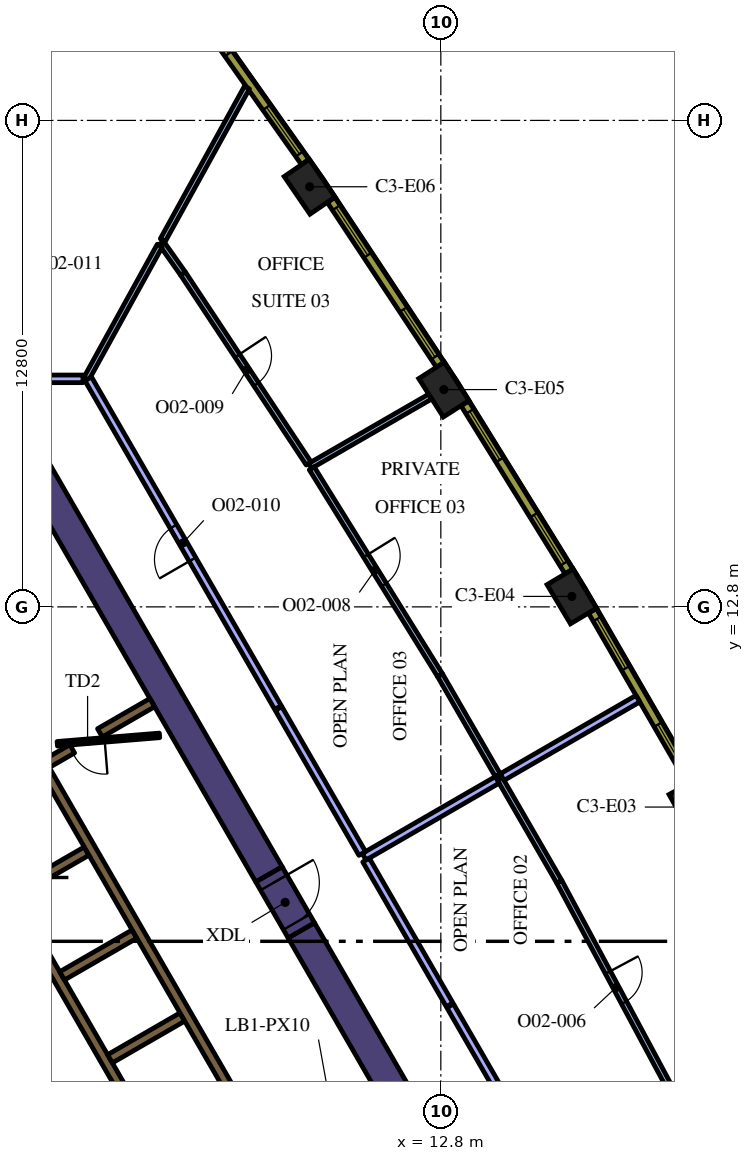
"""IFC4 building model, lengths in metres.
Left out: names, types, materials, properties, quantities, classifications, styles, units other than length and angle.
Written with IfcOpenShell. Run it as: python <this file> out.ifc"""

import sys

from ifc_helpers import new_model, si_unit, direction, frame, frame_2d, origin, origin_2d, place, context, subcontext, project, spatial, rectangle, extrude, element, fill, save


model = new_model("IFC4")
c1 = context("Model", 3, precision=1e-05, world=origin(), true_north=direction((0.0, 1.0)))
c2 = subcontext(c1, "Body", "Model", "MODEL_VIEW")
j1 = project(units=[si_unit("LENGTHUNIT", "METRE"), si_unit("PLANEANGLEUNIT", "RADIAN")], contexts=[c1])
p1 = place(None, origin())
s1 = spatial("IfcSite", under=j1, at=p1, CompositionType="ELEMENT")
p2 = place(p1, origin())
s2 = spatial("IfcBuilding", under=s1, at=p2, CompositionType="ELEMENT")
p3 = place(p2, frame((0.0, 0.0, 162.6)))
s3 = spatial("IfcBuildingStorey", under=s2, at=p3, CompositionType="ELEMENT", Elevation=162.6)
for number, where, z_axis, x_axis in (
    (1, (19.447, 7.533, 0.0), (0.0, 0.0, 1.0), (-0.487, 0.874, 0.0)),
    (2, (16.247, 13.075, 0.0), (0.0, 0.0, 1.0), (-0.513, 0.858, 0.0)),
    (3, (12.88, 18.517, 0.0), (0.0, 0.0, 1.0), (-0.539, 0.842, 0.0)),
    (4, (9.348, 23.854, 0.0), (0.0, 0.0, 1.0), (-0.565, 0.825, 0.0)),
):
    element("IfcColumn", number, at=place(p3, frame(where, z_axis=z_axis, x_axis=x_axis)), inside=s3, PredefinedType="COLUMN", context=c2, shape_type="SweptSolid", body=[
        extrude(rectangle(XDim=1.2, YDim=0.8, at=origin_2d()), origin(), (0.0, 0.0, 1.0), 4.2),
    ])
p4 = place(p3, frame((9.129, 4.289, 0.0), z_axis=(0.0, 0.0, 1.0), x_axis=(0.499995742806, -0.866027861663, 0.0)))
e5 = element("IfcWall", 5, at=p4, inside=s3, PredefinedType="SOLIDWALL", context=c2, shape_type="SweptSolid", body=[
    extrude(rectangle(XDim=12.527, YDim=0.8, at=frame_2d((6.264, 0.0))), origin(), (0.0, 0.0, 1.0), 4.2),
])
p5 = place(p3, frame((8.279, 5.761, 0.0), z_axis=(0.0, 0.0, 1.0), x_axis=(-0.500010359015, 0.866019422922, 0.0)))
e6 = element("IfcWall", 6, at=p5, inside=s3, PredefinedType="SOLIDWALL", context=c2, shape_type="SweptSolid", body=[
    extrude(rectangle(XDim=12.528, YDim=0.8, at=frame_2d((6.264, 0.0))), origin(), (0.0, 0.0, 1.0), 4.2),
])
p6 = place(p3, frame((6.568, -3.627, 0.0), z_axis=(0.0, 0.0, 1.0), x_axis=(-0.499999455981, 0.866025717874, 0.0)))
e7 = element("IfcWall", 7, at=p6, inside=s3, PredefinedType="SOLIDWALL", context=c2, shape_type="SweptSolid", body=[
    extrude(rectangle(XDim=11.978, YDim=0.25, at=frame_2d((5.989, 0.0))), origin(), (0.0, 0.0, 1.0), 4.2),
])
p7 = place(p3, frame((3.1, 9.064, 0.0), z_axis=(0.0, 0.0, 1.0), x_axis=(-0.866030133475, -0.499991807846, 0.0)))
e8 = element("IfcWall", 8, at=p7, inside=s3, PredefinedType="SOLIDWALL", context=c2, shape_type="SweptSolid", body=[
    extrude(rectangle(XDim=3.217, YDim=0.25, at=frame_2d((1.608, 0.0))), origin(), (0.0, 0.0, 1.0), 4.2),
])
p8 = place(p3, frame((1.574, 5.274, 0.0), z_axis=(0.0, 0.0, 1.0), x_axis=(0.866028486751, 0.499994660107, 0.0)))
e9 = element("IfcWall", 9, at=p8, inside=s3, PredefinedType="SOLIDWALL", context=c2, shape_type="SweptSolid", body=[
    extrude(rectangle(XDim=2.2, YDim=0.25, at=frame_2d((1.1, 0.0))), origin(), (0.0, 0.0, 1.0), 4.2),
])
for number, where, z_axis, x_axis in (
    (10, (2.834, 3.091, 0.0), (0.0, 0.0, 1.0), (0.866, 0.5, 0.0)),
    (11, (4.094, 0.909, 0.0), (0.0, 0.0, 1.0), (0.866, 0.5, 0.0)),
):
    element("IfcWall", number, at=place(p3, frame(where, z_axis=z_axis, x_axis=x_axis)), inside=s3, PredefinedType="SOLIDWALL", context=c2, shape_type="SweptSolid", body=[
        extrude(rectangle(XDim=2.2, YDim=0.25, at=frame_2d((1.1, 0.0))), origin(), (0.0, 0.0, 1.0), 4.2),
    ])
p9 = place(p3, frame((3.83, 9.486, 0.0), z_axis=(0.0, 0.0, 1.0), x_axis=(0.865986202621, 0.500067892261, 0.0)))
e12 = element("IfcWall", 12, at=p9, inside=s3, PredefinedType="SOLIDWALL", context=c2, shape_type="SweptSolid", body=[
    extrude(rectangle(XDim=1.591, YDim=0.25, at=frame_2d((0.795, 0.0))), origin(), (0.0, 0.0, 1.0), 4.2),
])
p10 = place(p3, frame((8.565, -2.185, 0.0), z_axis=(0.0, 0.0, 1.0), x_axis=(-0.499997954832, 0.866026584559, 0.0)))
e13 = element("IfcWall", 13, at=p10, inside=s3, PredefinedType="SOLIDWALL", context=c2, shape_type="SweptSolid", body=[
    extrude(rectangle(XDim=12.35, YDim=0.25, at=frame_2d((6.175, 0.0))), origin(), (0.0, 0.0, 1.0), 4.2),
])
p11 = place(p10, frame((0.585, 0.0, 0.0)))
e14 = element("IfcOpeningElement", 14, at=p11, cuts=e13, PredefinedType="OPENING", context=c2, shape_type="SweptSolid", body=[
    extrude(rectangle(XDim=1.1, YDim=2.1, at=frame_2d((0.55, 1.05))), frame((0.0, 0.135, 0.0), z_axis=(0.0, -1.0, 0.0), x_axis=(1.0, 0.0, 0.0)), (0.0, 0.0, 1.0), 0.27),
])
p12 = place(p3, frame((5.398, 9.419, 0.0), z_axis=(0.0, 0.0, 1.0), x_axis=(-0.996653416376, -0.081743303248, 0.0)))
e15 = element("IfcWall", 15, at=p12, inside=s3, PredefinedType="PARTITIONING", context=c2, shape_type="SweptSolid", body=[
    extrude(rectangle(XDim=2.7, YDim=0.12, at=frame_2d((1.35, 0.0))), origin(), (0.0, 0.0, 1.0), 3.15),
])
p13 = place(p12, frame((1.45, 0.0, 0.0)))
e16 = element("IfcOpeningElement", 16, at=p13, cuts=e15, PredefinedType="OPENING", context=c2, shape_type="SweptSolid", body=[
    extrude(rectangle(XDim=0.9, YDim=2.1, at=frame_2d((0.45, 1.05))), frame((0.0, 0.07, 0.0), z_axis=(0.0, -1.0, 0.0), x_axis=(1.0, 0.0, 0.0)), (0.0, 0.0, 1.0), 0.14),
])
p14 = place(p3, frame((8.279, 5.761, 0.0), z_axis=(0.0, 0.0, 1.0), x_axis=(0.500062241894, -0.865989465428, 0.0)))
e17 = element("IfcWall", 17, at=p14, inside=s3, PredefinedType="SOLIDWALL", context=c2, shape_type="SweptSolid", body=[
    extrude(rectangle(XDim=1.7, YDim=0.8, at=frame_2d((0.85, 0.0))), origin(), (0.0, 0.0, 1.0), 4.2),
])
p15 = place(p14, frame((0.25, 0.0, 0.0)))
e18 = element("IfcOpeningElement", 18, at=p15, cuts=e17, PredefinedType="OPENING", context=c2, shape_type="SweptSolid", body=[
    extrude(rectangle(XDim=1.2, YDim=2.1, at=frame_2d((0.6, 1.05))), frame((0.0, 0.41, 0.0), z_axis=(0.0, -1.0, 0.0), x_axis=(1.0, 0.0, 0.0)), (0.0, 0.0, 1.0), 0.82),
])
p16 = place(p3, frame((15.917, 5.566, 0.0), z_axis=(0.0, 0.0, 1.0), x_axis=(0.472485737981, -0.881338316088, 0.0)))
e19 = element("IfcWall", 19, at=p16, inside=s3, PredefinedType="PARTITIONING", context=c2, shape_type="SweptSolid", body=[
    extrude(rectangle(XDim=6.407, YDim=0.15, at=frame_2d((3.204, 0.0))), origin(), (0.0, 0.0, 1.0), 3.15),
])
p17 = place(p16, frame((2.707, 0.0, 0.0)))
e20 = element("IfcOpeningElement", 20, at=p17, cuts=e19, PredefinedType="OPENING", context=c2, shape_type="SweptSolid", body=[
    extrude(rectangle(XDim=0.9, YDim=2.1, at=frame_2d((0.45, 1.05))), frame((0.0, 0.085, 0.0), z_axis=(0.0, -1.0, 0.0), x_axis=(1.0, 0.0, 0.0)), (0.0, 0.0, 1.0), 0.17),
])
p18 = place(p3, frame((15.917, 5.566, 0.0), z_axis=(0.0, 0.0, 1.0), x_axis=(-0.499996312652, 0.866027532665, 0.0)))
e21 = element("IfcWall", 21, at=p18, inside=s3, PredefinedType="PARTITIONING", context=c2, shape_type="SweptSolid", body=[
    extrude(rectangle(XDim=3.138, YDim=0.15, at=frame_2d((1.569, 0.0))), origin(), (0.0, 0.0, 1.0), 3.15),
])
p19 = place(p3, frame((14.413, 8.322, 0.0), z_axis=(0.0, 0.0, 1.0), x_axis=(0.866034795751, 0.499983732284, 0.0)))
e22 = element("IfcWall", 22, at=p19, inside=s3, PredefinedType="PARTITIONING", context=c2, shape_type="SweptSolid", body=[
    extrude(rectangle(XDim=4.125, YDim=0.2, at=frame_2d((2.062, 0.0))), origin(), (0.0, 0.0, 1.0), 3.15),
])
p20 = place(p3, frame((10.782, 6.225, 0.0), z_axis=(0.0, 0.0, 1.0), x_axis=(0.866034752867, 0.499983806564, 0.0)))
e23 = element("IfcWall", 23, at=p20, inside=s3, PredefinedType="PARTITIONING", context=c2, shape_type="SweptSolid", body=[
    extrude(rectangle(XDim=4.043, YDim=0.2, at=frame_2d((2.021, 0.0))), origin(), (0.0, 0.0, 1.0), 3.15),
])
p21 = place(p3, frame((13.032, 2.328, 0.0), z_axis=(0.0, 0.0, 1.0), x_axis=(-0.499988222896, 0.866032203192, 0.0)))
e24 = element("IfcWall", 24, at=p21, inside=s3, PredefinedType="PARTITIONING", context=c2, shape_type="SweptSolid", body=[
    extrude(rectangle(XDim=4.4, YDim=0.2, at=frame_2d((2.2, 0.0))), origin(), (0.0, 0.0, 1.0), 3.15),
])
p22 = place(p3, frame((18.042, -6.35, 0.0), z_axis=(0.0, 0.0, 1.0), x_axis=(-0.499986873641, 0.866032982159, 0.0)))
e25 = element("IfcWall", 25, at=p22, inside=s3, PredefinedType="PARTITIONING", context=c2, shape_type="SweptSolid", body=[
    extrude(rectangle(XDim=9.99, YDim=0.2, at=frame_2d((4.995, 0.0))), origin(), (0.0, 0.0, 1.0), 3.15),
])
p23 = place(p22, frame((4.5, 0.0, 0.0)))
e26 = element("IfcOpeningElement", 26, at=p23, cuts=e25, PredefinedType="OPENING", context=c2, shape_type="SweptSolid", body=[
    extrude(rectangle(XDim=1.0, YDim=2.1, at=frame_2d((0.5, 1.05))), frame((0.0, 0.11, 0.0), z_axis=(0.0, -1.0, 0.0), x_axis=(1.0, 0.0, 0.0)), (0.0, 0.0, 1.0), 0.22),
])
p24 = place(p3, frame((9.363, 16.511, 0.0), z_axis=(0.0, 0.0, 1.0), x_axis=(0.866006134298, 0.500033374244, 0.0)))
e27 = element("IfcWall", 27, at=p24, inside=s3, PredefinedType="PARTITIONING", context=c2, shape_type="SweptSolid", body=[
    extrude(rectangle(XDim=3.648, YDim=0.15, at=frame_2d((1.824, 0.0))), origin(), (0.0, 0.0, 1.0), 3.15),
])
p25 = place(p3, frame((14.299, 8.371, 0.0), z_axis=(0.0, 0.0, 1.0), x_axis=(-0.500019211527, 0.86601431172, 0.0)))
e28 = element("IfcWall", 28, at=p25, inside=s3, PredefinedType="PARTITIONING", context=c2, shape_type="SweptSolid", body=[
    extrude(rectangle(XDim=3.039, YDim=0.15, at=frame_2d((1.519, 0.0))), origin(), (0.0, 0.0, 1.0), 3.15),
])
p26 = place(p3, frame((9.403, 16.447, 0.0), z_axis=(0.0, 0.0, 1.0), x_axis=(0.527026092571, -0.849849102929, 0.0)))
e29 = element("IfcWall", 29, at=p26, inside=s3, PredefinedType="PARTITIONING", context=c2, shape_type="SweptSolid", body=[
    extrude(rectangle(XDim=6.407, YDim=0.15, at=frame_2d((3.204, 0.0))), origin(), (0.0, 0.0, 1.0), 3.15),
])
p27 = place(p26, frame((2.707, 0.0, 0.0)))
e30 = element("IfcOpeningElement", 30, at=p27, cuts=e29, PredefinedType="OPENING", context=c2, shape_type="SweptSolid", body=[
    extrude(rectangle(XDim=0.9, YDim=2.1, at=frame_2d((0.45, 1.05))), frame((0.0, 0.085, 0.0), z_axis=(0.0, -1.0, 0.0), x_axis=(1.0, 0.0, 0.0)), (0.0, 0.0, 1.0), 0.17),
])
p28 = place(p3, frame((6.013, 21.573, 0.0), z_axis=(0.0, 0.0, 1.0), x_axis=(0.551906048292, -0.833906298009, 0.0)))
e31 = element("IfcWall", 31, at=p28, inside=s3, PredefinedType="PARTITIONING", context=c2, shape_type="SweptSolid", body=[
    extrude(rectangle(XDim=5.995, YDim=0.15, at=frame_2d((2.998, 0.0))), origin(), (0.0, 0.0, 1.0), 3.15),
])
p29 = place(p28, frame((2.595, 0.0, 0.0)))
e32 = element("IfcOpeningElement", 32, at=p29, cuts=e31, PredefinedType="OPENING", context=c2, shape_type="SweptSolid", body=[
    extrude(rectangle(XDim=0.9, YDim=2.1, at=frame_2d((0.45, 1.05))), frame((0.0, 0.085, 0.0), z_axis=(0.0, -1.0, 0.0), x_axis=(1.0, 0.0, 0.0)), (0.0, 0.0, 1.0), 0.17),
])
p30 = place(p3, frame((6.013, 21.573, 0.0), z_axis=(0.0, 0.0, 1.0), x_axis=(-0.576965221715, 0.816768714467, 0.0)))
e33 = element("IfcWall", 33, at=p30, inside=s3, PredefinedType="PARTITIONING", context=c2, shape_type="SweptSolid", body=[
    extrude(rectangle(XDim=0.986, YDim=0.15, at=frame_2d((0.493, 0.0))), origin(), (0.0, 0.0, 1.0), 3.15),
])
p31 = place(p3, frame((5.484, 22.451, 0.0), z_axis=(0.0, 0.0, 1.0), x_axis=(0.483018213307, 0.875610304652, 0.0)))
e34 = element("IfcWall", 34, at=p31, inside=s3, PredefinedType="PARTITIONING", context=c2, shape_type="SweptSolid", body=[
    extrude(rectangle(XDim=4.584, YDim=0.15, at=frame_2d((2.292, 0.0))), origin(), (0.0, 0.0, 1.0), 3.15),
])
p32 = place(p3, frame((3.47, 18.8, 0.0), z_axis=(0.0, 0.0, 1.0), x_axis=(0.483004783308, 0.87561771299, 0.0)))
e35 = element("IfcWall", 35, at=p32, inside=s3, PredefinedType="PARTITIONING", context=c2, shape_type="SweptSolid", body=[
    extrude(rectangle(XDim=4.003, YDim=0.15, at=frame_2d((2.001, 0.0))), origin(), (0.0, 0.0, 1.0), 3.15),
])
p33 = place(p3, frame((10.732, 6.312, 0.0), z_axis=(0.0, 0.0, 1.0), x_axis=(-0.499984786451, 0.866034187153, 0.0)))
e36 = element("IfcWall", 36, at=p33, inside=s3, PredefinedType="PARTITIONING", context=c2, shape_type="SweptSolid", body=[
    extrude(rectangle(XDim=4.404, YDim=0.2, at=frame_2d((2.202, 0.0))), origin(), (0.0, 0.0, 1.0), 3.15),
])
p34 = place(p3, frame((8.515, 10.152, 0.0), z_axis=(0.0, 0.0, 1.0), x_axis=(-0.499998974385, 0.866025995923, 0.0)))
e37 = element("IfcWall", 37, at=p34, inside=s3, PredefinedType="PARTITIONING", context=c2, shape_type="SweptSolid", body=[
    extrude(rectangle(XDim=9.986, YDim=0.2, at=frame_2d((4.993, 0.0))), origin(), (0.0, 0.0, 1.0), 3.15),
])
p35 = place(p34, frame((4.5, 0.0, 0.0)))
e38 = element("IfcOpeningElement", 38, at=p35, cuts=e37, PredefinedType="OPENING", context=c2, shape_type="SweptSolid", body=[
    extrude(rectangle(XDim=1.0, YDim=2.1, at=frame_2d((0.5, 1.05))), frame((0.0, 0.11, 0.0), z_axis=(0.0, -1.0, 0.0), x_axis=(1.0, 0.0, 0.0)), (0.0, 0.0, 1.0), 0.22),
])
p36 = place(p3, frame((3.385, 18.8, 0.0), z_axis=(0.0, 0.0, 1.0), x_axis=(-1.0, 0.0, 0.0)))
e39 = element("IfcWall", 39, at=p36, inside=s3, PredefinedType="PARTITIONING", context=c2, shape_type="SweptSolid", body=[
    extrude(rectangle(XDim=2.185, YDim=0.2, at=frame_2d((1.092, 0.0))), origin(), (0.0, 0.0, 1.0), 3.15),
])
p37 = place(p3, frame((19.391, 8.191, 0.0), z_axis=(0.0, 0.0, 1.0), x_axis=(-0.500009456303, 0.866019944116, 0.0)))
e40 = element("IfcWall", 40, at=p37, inside=s3, PredefinedType="SOLIDWALL", context=c2, shape_type="SweptSolid", body=[
    extrude(rectangle(XDim=5.204, YDim=0.24, at=frame_2d((2.602, 0.0))), origin(), (0.0, 0.0, 1.0), 3.95),
])
p38 = place(p37, frame((0.248, 0.0, 0.9)))
e41 = element("IfcOpeningElement", 41, at=p38, cuts=e40, PredefinedType="OPENING", context=c2, shape_type="SweptSolid", body=[
    extrude(rectangle(XDim=1.5, YDim=2.55, at=frame_2d((0.75, 1.275))), frame((0.0, 0.13, 0.0), z_axis=(0.0, -1.0, 0.0), x_axis=(1.0, 0.0, 0.0)), (0.0, 0.0, 1.0), 0.26),
])
p39 = place(p37, frame((3.455, 0.0, 0.9)))
e42 = element("IfcOpeningElement", 42, at=p39, cuts=e40, PredefinedType="OPENING", context=c2, shape_type="SweptSolid", body=[
    extrude(rectangle(XDim=1.5, YDim=2.55, at=frame_2d((0.75, 1.275))), frame((0.0, 0.13, 0.0), z_axis=(0.0, -1.0, 0.0), x_axis=(1.0, 0.0, 0.0)), (0.0, 0.0, 1.0), 0.26),
])
p40 = place(p3, frame((16.171, 13.731, 0.0), z_axis=(0.0, 0.0, 1.0), x_axis=(-0.526197926587, 0.850362124072, 0.0)))
e43 = element("IfcWall", 43, at=p40, inside=s3, PredefinedType="SOLIDWALL", context=c2, shape_type="SweptSolid", body=[
    extrude(rectangle(XDim=5.203, YDim=0.24, at=frame_2d((2.602, 0.0))), origin(), (0.0, 0.0, 1.0), 3.95),
])
p41 = place(p40, frame((0.248, 0.0, 0.9)))
e44 = element("IfcOpeningElement", 44, at=p41, cuts=e43, PredefinedType="OPENING", context=c2, shape_type="SweptSolid", body=[
    extrude(rectangle(XDim=1.5, YDim=2.55, at=frame_2d((0.75, 1.275))), frame((0.0, 0.13, 0.0), z_axis=(0.0, -1.0, 0.0), x_axis=(1.0, 0.0, 0.0)), (0.0, 0.0, 1.0), 0.26),
])
p42 = place(p40, frame((3.455, 0.0, 0.9)))
e45 = element("IfcOpeningElement", 45, at=p42, cuts=e43, PredefinedType="OPENING", context=c2, shape_type="SweptSolid", body=[
    extrude(rectangle(XDim=1.5, YDim=2.55, at=frame_2d((0.75, 1.275))), frame((0.0, 0.13, 0.0), z_axis=(0.0, -1.0, 0.0), x_axis=(1.0, 0.0, 0.0)), (0.0, 0.0, 1.0), 0.26),
])
p43 = place(p3, frame((12.783, 19.171, 0.0), z_axis=(0.0, 0.0, 1.0), x_axis=(-0.551892811511, 0.833915058386, 0.0)))
e46 = element("IfcWall", 46, at=p43, inside=s3, PredefinedType="SOLIDWALL", context=c2, shape_type="SweptSolid", body=[
    extrude(rectangle(XDim=5.204, YDim=0.24, at=frame_2d((2.602, 0.0))), origin(), (0.0, 0.0, 1.0), 3.95),
])
p44 = place(p43, frame((0.248, 0.0, 0.9)))
e47 = element("IfcOpeningElement", 47, at=p44, cuts=e46, PredefinedType="OPENING", context=c2, shape_type="SweptSolid", body=[
    extrude(rectangle(XDim=1.5, YDim=2.55, at=frame_2d((0.75, 1.275))), frame((0.0, 0.13, 0.0), z_axis=(0.0, -1.0, 0.0), x_axis=(1.0, 0.0, 0.0)), (0.0, 0.0, 1.0), 0.26),
])
p45 = place(p43, frame((3.455, 0.0, 0.9)))
e48 = element("IfcOpeningElement", 48, at=p45, cuts=e46, PredefinedType="OPENING", context=c2, shape_type="SweptSolid", body=[
    extrude(rectangle(XDim=1.5, YDim=2.55, at=frame_2d((0.75, 1.275))), frame((0.0, 0.13, 0.0), z_axis=(0.0, -1.0, 0.0), x_axis=(1.0, 0.0, 0.0)), (0.0, 0.0, 1.0), 0.26),
])
p46 = place(p3, frame((9.231, 24.504, 0.0), z_axis=(0.0, 0.0, 1.0), x_axis=(-0.577115207679, 0.816662743772, 0.0)))
e49 = element("IfcWall", 49, at=p46, inside=s3, PredefinedType="SOLIDWALL", context=c2, shape_type="SweptSolid", body=[
    extrude(rectangle(XDim=5.213, YDim=0.24, at=frame_2d((2.606, 0.0))), origin(), (0.0, 0.0, 1.0), 3.95),
])
p47 = place(p46, frame((0.261, 0.0, 0.9)))
e50 = element("IfcOpeningElement", 50, at=p47, cuts=e49, PredefinedType="OPENING", context=c2, shape_type="SweptSolid", body=[
    extrude(rectangle(XDim=1.5, YDim=2.55, at=frame_2d((0.75, 1.275))), frame((0.0, 0.13, 0.0), z_axis=(0.0, -1.0, 0.0), x_axis=(1.0, 0.0, 0.0)), (0.0, 0.0, 1.0), 0.26),
])
p48 = place(p46, frame((3.492, 0.0, 0.9)))
e51 = element("IfcOpeningElement", 51, at=p48, cuts=e49, PredefinedType="OPENING", context=c2, shape_type="SweptSolid", body=[
    extrude(rectangle(XDim=1.5, YDim=2.55, at=frame_2d((0.75, 1.275))), frame((0.0, 0.13, 0.0), z_axis=(0.0, -1.0, 0.0), x_axis=(1.0, 0.0, 0.0)), (0.0, 0.0, 1.0), 0.26),
])
p49 = place(p13, origin())
e52 = element("IfcDoor", 52, at=p49, inside=s3, OperationType="SINGLE_SWING_LEFT", PredefinedType="DOOR", context=c2, shape_type="SweptSolid", body=[
    extrude(rectangle(XDim=0.9, YDim=2.1, at=frame_2d((0.45, 1.05))), frame((0.0, 0.025, 0.0), z_axis=(0.0, -1.0, 0.0), x_axis=(1.0, 0.0, 0.0)), (0.0, 0.0, 1.0), 0.05),
])
fill(e16, e52)
p50 = place(p15, origin())
e53 = element("IfcDoor", 53, at=p50, inside=s3, OperationType="SINGLE_SWING_LEFT", PredefinedType="DOOR", context=c2, shape_type="SweptSolid", body=[
    extrude(rectangle(XDim=1.2, YDim=2.1, at=frame_2d((0.6, 1.05))), frame((0.0, 0.025, 0.0), z_axis=(0.0, -1.0, 0.0), x_axis=(1.0, 0.0, 0.0)), (0.0, 0.0, 1.0), 0.05),
])
fill(e18, e53)
p51 = place(p17, origin())
e54 = element("IfcDoor", 54, at=p51, inside=s3, OperationType="SINGLE_SWING_LEFT", PredefinedType="DOOR", context=c2, shape_type="SweptSolid", body=[
    extrude(rectangle(XDim=0.9, YDim=2.1, at=frame_2d((0.45, 1.05))), frame((0.0, 0.025, 0.0), z_axis=(0.0, -1.0, 0.0), x_axis=(1.0, 0.0, 0.0)), (0.0, 0.0, 1.0), 0.05),
])
fill(e20, e54)
p52 = place(p27, origin())
e55 = element("IfcDoor", 55, at=p52, inside=s3, OperationType="SINGLE_SWING_LEFT", PredefinedType="DOOR", context=c2, shape_type="SweptSolid", body=[
    extrude(rectangle(XDim=0.9, YDim=2.1, at=frame_2d((0.45, 1.05))), frame((0.0, 0.025, 0.0), z_axis=(0.0, -1.0, 0.0), x_axis=(1.0, 0.0, 0.0)), (0.0, 0.0, 1.0), 0.05),
])
fill(e30, e55)
p53 = place(p29, origin())
e56 = element("IfcDoor", 56, at=p53, inside=s3, OperationType="SINGLE_SWING_RIGHT", PredefinedType="DOOR", context=c2, shape_type="SweptSolid", body=[
    extrude(rectangle(XDim=0.9, YDim=2.1, at=frame_2d((0.45, 1.05))), frame((0.0, 0.025, 0.0), z_axis=(0.0, -1.0, 0.0), x_axis=(1.0, 0.0, 0.0)), (0.0, 0.0, 1.0), 0.05),
])
fill(e32, e56)
p54 = place(p35, origin())
e57 = element("IfcDoor", 57, at=p54, inside=s3, OperationType="SINGLE_SWING_RIGHT", PredefinedType="DOOR", context=c2, shape_type="SweptSolid", body=[
    extrude(rectangle(XDim=1.0, YDim=2.1, at=frame_2d((0.5, 1.05))), frame((0.0, 0.025, 0.0), z_axis=(0.0, -1.0, 0.0), x_axis=(1.0, 0.0, 0.0)), (0.0, 0.0, 1.0), 0.05),
])
fill(e38, e57)
p55 = place(p38, origin())
e58 = element("IfcWindow", 58, at=p55, inside=s3, PartitioningType="SINGLE_PANEL", PredefinedType="WINDOW", context=c2, shape_type="SweptSolid", body=[
    extrude(rectangle(XDim=1.5, YDim=2.55, at=frame_2d((0.75, 1.275))), frame((0.0, 0.04, 0.0), z_axis=(0.0, -1.0, 0.0), x_axis=(1.0, 0.0, 0.0)), (0.0, 0.0, 1.0), 0.06),
])
fill(e41, e58)
p56 = place(p39, origin())
e59 = element("IfcWindow", 59, at=p56, inside=s3, PartitioningType="SINGLE_PANEL", PredefinedType="WINDOW", context=c2, shape_type="SweptSolid", body=[
    extrude(rectangle(XDim=1.5, YDim=2.55, at=frame_2d((0.75, 1.275))), frame((0.0, 0.04, 0.0), z_axis=(0.0, -1.0, 0.0), x_axis=(1.0, 0.0, 0.0)), (0.0, 0.0, 1.0), 0.06),
])
fill(e42, e59)
p57 = place(p41, origin())
e60 = element("IfcWindow", 60, at=p57, inside=s3, PartitioningType="SINGLE_PANEL", PredefinedType="WINDOW", context=c2, shape_type="SweptSolid", body=[
    extrude(rectangle(XDim=1.5, YDim=2.55, at=frame_2d((0.75, 1.275))), frame((0.0, 0.04, 0.0), z_axis=(0.0, -1.0, 0.0), x_axis=(1.0, 0.0, 0.0)), (0.0, 0.0, 1.0), 0.06),
])
fill(e44, e60)
p58 = place(p42, origin())
e61 = element("IfcWindow", 61, at=p58, inside=s3, PartitioningType="SINGLE_PANEL", PredefinedType="WINDOW", context=c2, shape_type="SweptSolid", body=[
    extrude(rectangle(XDim=1.5, YDim=2.55, at=frame_2d((0.75, 1.275))), frame((0.0, 0.04, 0.0), z_axis=(0.0, -1.0, 0.0), x_axis=(1.0, 0.0, 0.0)), (0.0, 0.0, 1.0), 0.06),
])
fill(e45, e61)
p59 = place(p44, origin())
e62 = element("IfcWindow", 62, at=p59, inside=s3, PartitioningType="SINGLE_PANEL", PredefinedType="WINDOW", context=c2, shape_type="SweptSolid", body=[
    extrude(rectangle(XDim=1.5, YDim=2.55, at=frame_2d((0.75, 1.275))), frame((0.0, 0.04, 0.0), z_axis=(0.0, -1.0, 0.0), x_axis=(1.0, 0.0, 0.0)), (0.0, 0.0, 1.0), 0.06),
])
fill(e47, e62)
p60 = place(p45, origin())
e63 = element("IfcWindow", 63, at=p60, inside=s3, PartitioningType="SINGLE_PANEL", PredefinedType="WINDOW", context=c2, shape_type="SweptSolid", body=[
    extrude(rectangle(XDim=1.5, YDim=2.55, at=frame_2d((0.75, 1.275))), frame((0.0, 0.04, 0.0), z_axis=(0.0, -1.0, 0.0), x_axis=(1.0, 0.0, 0.0)), (0.0, 0.0, 1.0), 0.06),
])
fill(e48, e63)
p61 = place(p47, origin())
e64 = element("IfcWindow", 64, at=p61, inside=s3, PartitioningType="SINGLE_PANEL", PredefinedType="WINDOW", context=c2, shape_type="SweptSolid", body=[
    extrude(rectangle(XDim=1.5, YDim=2.55, at=frame_2d((0.75, 1.275))), frame((0.0, 0.04, 0.0), z_axis=(0.0, -1.0, 0.0), x_axis=(1.0, 0.0, 0.0)), (0.0, 0.0, 1.0), 0.06),
])
fill(e50, e64)
p62 = place(p48, origin())
e65 = element("IfcWindow", 65, at=p62, inside=s3, PartitioningType="SINGLE_PANEL", PredefinedType="WINDOW", context=c2, shape_type="SweptSolid", body=[
    extrude(rectangle(XDim=1.5, YDim=2.55, at=frame_2d((0.75, 1.275))), frame((0.0, 0.04, 0.0), z_axis=(0.0, -1.0, 0.0), x_axis=(1.0, 0.0, 0.0)), (0.0, 0.0, 1.0), 0.06),
])
fill(e51, e65)
save(model, sys.argv[1])
